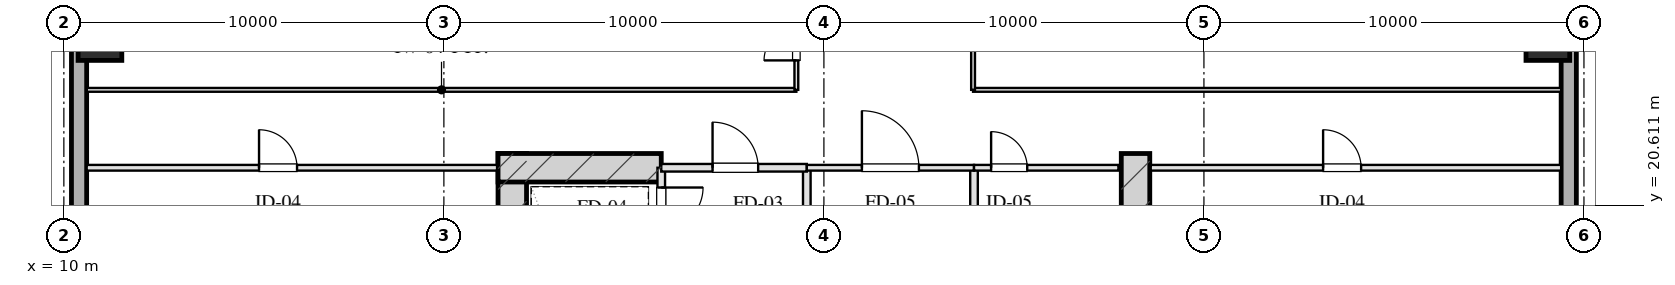
"""IFC4 building model, lengths in metres.
Left out: names, types, materials, properties, quantities, classifications, styles, units other than length and angle.
Written with IfcOpenShell. Run it as: python <this file> out.ifc"""

import sys

from ifc_helpers import new_model, si_unit, direction, frame, frame_2d, origin, origin_2d, place, context, subcontext, project, spatial, rectangle, hollow_rectangle, extrude, element, fill, save


model = new_model("IFC4")
c1 = context("Model", 3, precision=1e-05, world=origin(), true_north=direction((0.0, 1.0)))
c2 = subcontext(c1, "Body", "Model", "MODEL_VIEW")
j1 = project(units=[si_unit("LENGTHUNIT", "METRE"), si_unit("PLANEANGLEUNIT", "RADIAN")], contexts=[c1])
p1 = place(None, origin())
s1 = spatial("IfcSite", under=j1, at=p1, CompositionType="ELEMENT")
p2 = place(p1, origin())
s2 = spatial("IfcBuilding", under=s1, at=p2, CompositionType="ELEMENT")
p3 = place(p2, frame((0.0, 0.0, 38.0)))
s3 = spatial("IfcBuildingStorey", under=s2, at=p3, CompositionType="ELEMENT", Elevation=38.0)
for number, where, z_axis, x_axis in (
    (1, (21.8, 21.975, 0.0), (0.0, 0.0, 1.0), (0.0, -1.0, 0.0)),
    (2, (38.2, 21.975, 0.0), (0.0, 0.0, 1.0), (0.0, -1.0, 0.0)),
):
    element("IfcWall", number, at=place(p3, frame(where, z_axis=z_axis, x_axis=x_axis)), inside=s3, PredefinedType="SHEAR", context=c2, shape_type="SweptSolid", body=[
        extrude(rectangle(XDim=9.63, YDim=0.75, at=frame_2d((4.815, 0.0))), origin(), (0.0, 0.0, 1.0), 4.0),
    ])
p4 = place(p3, frame((21.425, 21.6, 0.0), z_axis=(0.0, 0.0, 1.0), x_axis=(1.0, 0.0, 0.0)))
e3 = element("IfcWall", 3, at=p4, inside=s3, PredefinedType="SHEAR", context=c2, shape_type="SweptSolid", body=[
    extrude(rectangle(XDim=4.295, YDim=0.75, at=frame_2d((2.147, 0.0))), origin(), (0.0, 0.0, 1.0), 4.0),
])
for number, where, z_axis, x_axis in (
    (4, (10.95, 25.0, 0.0), (0.0, 0.0, 1.0), (1.0, 0.0, 0.0)),
    (5, (49.05, 25.0, 0.0), (0.0, 0.0, 1.0), (1.0, 0.0, 0.0)),
):
    element("IfcColumn", number, at=place(p3, frame(where, z_axis=z_axis, x_axis=x_axis)), inside=s3, PredefinedType="COLUMN", context=c2, shape_type="SweptSolid", body=[
        extrude(hollow_rectangle(XDim=1.15, YDim=1.15, WallThickness=0.04, at=origin_2d()), origin(), (0.0, 0.0, 1.0), 4.001),
    ])
p5 = place(p3, frame((10.4, 7.2, 0.0), z_axis=(0.0, 0.0, 1.0), x_axis=(0.0, 1.0, 0.0)))
e6 = element("IfcWall", 6, at=p5, inside=s3, PredefinedType="SOLIDWALL", context=c2, shape_type="SweptSolid", body=[
    extrude(rectangle(XDim=53.6, YDim=0.4, at=frame_2d((26.8, 0.0))), origin(), (0.0, 0.0, 1.0), 3.16),
])
p6 = place(p5, frame((28.15, 0.0, 0.75)))
e7 = element("IfcOpeningElement", 7, at=p6, cuts=e6, PredefinedType="OPENING", context=c2, shape_type="SweptSolid", body=[
    extrude(rectangle(XDim=2.5, YDim=1.75, at=frame_2d((1.25, 0.875))), frame((0.0, 0.21, 0.0), z_axis=(0.0, -1.0, 0.0), x_axis=(1.0, 0.0, 0.0)), (0.0, 0.0, 1.0), 0.42),
])
p7 = place(p5, frame((20.45, 0.0, 0.0)))
e8 = element("IfcOpeningElement", 8, at=p7, cuts=e6, PredefinedType="OPENING", context=c2, shape_type="SweptSolid", body=[
    extrude(rectangle(XDim=1.1, YDim=2.15, at=frame_2d((0.55, 1.075))), frame((0.0, 0.21, 0.0), z_axis=(0.0, -1.0, 0.0), x_axis=(1.0, 0.0, 0.0)), (0.0, 0.0, 1.0), 0.42),
])
p8 = place(p3, frame((49.6, 60.8, 0.0), z_axis=(0.0, 0.0, 1.0), x_axis=(0.0, -1.0, 0.0)))
e9 = element("IfcWall", 9, at=p8, inside=s3, PredefinedType="SOLIDWALL", context=c2, shape_type="SweptSolid", body=[
    extrude(rectangle(XDim=53.6, YDim=0.4, at=frame_2d((26.8, 0.0))), origin(), (0.0, 0.0, 1.0), 3.16),
])
p9 = place(p8, frame((19.15, 0.0, 0.75)))
e10 = element("IfcOpeningElement", 10, at=p9, cuts=e9, PredefinedType="OPENING", context=c2, shape_type="SweptSolid", body=[
    extrude(rectangle(XDim=2.5, YDim=1.75, at=frame_2d((1.25, 0.875))), frame((0.0, 0.21, 0.0), z_axis=(0.0, -1.0, 0.0), x_axis=(1.0, 0.0, 0.0)), (0.0, 0.0, 1.0), 0.42),
])
p10 = place(p8, frame((32.05, 0.0, 0.0)))
e11 = element("IfcOpeningElement", 11, at=p10, cuts=e9, PredefinedType="OPENING", context=c2, shape_type="SweptSolid", body=[
    extrude(rectangle(XDim=1.1, YDim=2.15, at=frame_2d((0.55, 1.075))), frame((0.0, 0.21, 0.0), z_axis=(0.0, -1.0, 0.0), x_axis=(1.0, 0.0, 0.0)), (0.0, 0.0, 1.0), 0.42),
])
p11 = place(p3, frame((25.72, 21.6, 0.0), z_axis=(0.0, 0.0, 1.0), x_axis=(0.0, -1.0, 0.0)))
e12 = element("IfcWall", 12, at=p11, inside=s3, PredefinedType="PARTITIONING", context=c2, shape_type="SweptSolid", body=[
    extrude(rectangle(XDim=1.9, YDim=0.2, at=frame_2d((0.95, 0.0))), origin(), (0.0, 0.0, 1.0), 3.725),
])
p12 = place(p11, frame((0.52, 0.0, 0.0)))
e13 = element("IfcOpeningElement", 13, at=p12, cuts=e12, PredefinedType="OPENING", context=c2, shape_type="SweptSolid", body=[
    extrude(rectangle(XDim=1.1, YDim=2.05, at=frame_2d((0.55, 1.025))), frame((0.0, 0.11, 0.0), z_axis=(0.0, -1.0, 0.0), x_axis=(1.0, 0.0, 0.0)), (0.0, 0.0, 1.0), 0.22),
])
p13 = place(p3, frame((29.55, 21.6, 0.0), z_axis=(0.0, 0.0, 1.0), x_axis=(0.0, -1.0, 0.0)))
e14 = element("IfcWall", 14, at=p13, inside=s3, PredefinedType="PARTITIONING", context=c2, shape_type="SweptSolid", body=[
    extrude(rectangle(XDim=8.43, YDim=0.2, at=frame_2d((4.215, 0.0))), origin(), (0.0, 0.0, 1.0), 3.725),
])
p14 = place(p3, frame((25.72, 21.6, 0.0), z_axis=(0.0, 0.0, 1.0), x_axis=(1.0, 0.0, 0.0)))
e15 = element("IfcWall", 15, at=p14, inside=s3, PredefinedType="PARTITIONING", context=c2, shape_type="SweptSolid", body=[
    extrude(rectangle(XDim=3.83, YDim=0.2, at=frame_2d((1.915, 0.0))), origin(), (0.0, 0.0, 1.0), 3.725),
])
p15 = place(p14, frame((1.35, 0.0, 0.0)))
e16 = element("IfcOpeningElement", 16, at=p15, cuts=e15, PredefinedType="OPENING", context=c2, shape_type="SweptSolid", body=[
    extrude(rectangle(XDim=1.2, YDim=2.05, at=frame_2d((0.6, 1.025))), frame((0.0, 0.11, 0.0), z_axis=(0.0, -1.0, 0.0), x_axis=(1.0, 0.0, 0.0)), (0.0, 0.0, 1.0), 0.22),
])
p16 = place(p3, frame((33.95, 21.6, 0.0), z_axis=(0.0, 0.0, 1.0), x_axis=(0.0, -1.0, 0.0)))
e17 = element("IfcWall", 17, at=p16, inside=s3, PredefinedType="PARTITIONING", context=c2, shape_type="SweptSolid", body=[
    extrude(rectangle(XDim=8.43, YDim=0.2, at=frame_2d((4.215, 0.0))), origin(), (0.0, 0.0, 1.0), 3.725),
])
p17 = place(p3, frame((29.55, 21.6, 0.0), z_axis=(0.0, 0.0, 1.0), x_axis=(1.0, 0.0, 0.0)))
e18 = element("IfcWall", 18, at=p17, inside=s3, PredefinedType="PARTITIONING", context=c2, shape_type="SweptSolid", body=[
    extrude(rectangle(XDim=4.4, YDim=0.15, at=frame_2d((2.2, 0.0))), origin(), (0.0, 0.0, 1.0), 3.725),
])
p18 = place(p17, frame((1.45, 0.0, 0.0)))
e19 = element("IfcOpeningElement", 19, at=p18, cuts=e18, PredefinedType="OPENING", context=c2, shape_type="SweptSolid", body=[
    extrude(rectangle(XDim=1.5, YDim=2.05, at=frame_2d((0.75, 1.025))), frame((0.0, 0.085, 0.0), z_axis=(0.0, -1.0, 0.0), x_axis=(1.0, 0.0, 0.0)), (0.0, 0.0, 1.0), 0.17),
])
p19 = place(p3, frame((33.95, 21.6, 0.0), z_axis=(0.0, 0.0, 1.0), x_axis=(1.0, 0.0, 0.0)))
e20 = element("IfcWall", 20, at=p19, inside=s3, PredefinedType="PARTITIONING", context=c2, shape_type="SweptSolid", body=[
    extrude(rectangle(XDim=3.8, YDim=0.15, at=frame_2d((1.9, 0.0))), origin(), (0.0, 0.0, 1.0), 3.725),
])
p20 = place(p19, frame((0.45, 0.0, 0.0)))
e21 = element("IfcOpeningElement", 21, at=p20, cuts=e20, PredefinedType="OPENING", context=c2, shape_type="SweptSolid", body=[
    extrude(rectangle(XDim=0.95, YDim=2.05, at=frame_2d((0.475, 1.025))), frame((0.0, 0.085, 0.0), z_axis=(0.0, -1.0, 0.0), x_axis=(1.0, 0.0, 0.0)), (0.0, 0.0, 1.0), 0.17),
])
p21 = place(p3, frame((10.6, 21.6, 0.0), z_axis=(0.0, 0.0, 1.0), x_axis=(1.0, 0.0, 0.0)))
e22 = element("IfcWall", 22, at=p21, inside=s3, PredefinedType="PARTITIONING", context=c2, shape_type="SweptSolid", body=[
    extrude(rectangle(XDim=10.8, YDim=0.15, at=frame_2d((5.4, 0.0))), origin(), (0.0, 0.0, 1.0), 3.725),
])
p22 = place(p21, frame((4.536, 0.0, 0.0)))
e23 = element("IfcOpeningElement", 23, at=p22, cuts=e22, PredefinedType="OPENING", context=c2, shape_type="SweptSolid", body=[
    extrude(rectangle(XDim=1.0, YDim=2.05, at=frame_2d((0.5, 1.025))), frame((0.0, 0.085, 0.0), z_axis=(0.0, -1.0, 0.0), x_axis=(1.0, 0.0, 0.0)), (0.0, 0.0, 1.0), 0.17),
])
p23 = place(p3, frame((38.6, 21.6, 0.0), z_axis=(0.0, 0.0, 1.0), x_axis=(1.0, 0.0, 0.0)))
e24 = element("IfcWall", 24, at=p23, inside=s3, PredefinedType="PARTITIONING", context=c2, shape_type="SweptSolid", body=[
    extrude(rectangle(XDim=10.8, YDim=0.15, at=frame_2d((5.4, 0.0))), origin(), (0.0, 0.0, 1.0), 3.725),
])
p24 = place(p23, frame((4.536, 0.0, 0.0)))
e25 = element("IfcOpeningElement", 25, at=p24, cuts=e24, PredefinedType="OPENING", context=c2, shape_type="SweptSolid", body=[
    extrude(rectangle(XDim=1.0, YDim=2.05, at=frame_2d((0.5, 1.025))), frame((0.0, 0.085, 0.0), z_axis=(0.0, -1.0, 0.0), x_axis=(1.0, 0.0, 0.0)), (0.0, 0.0, 1.0), 0.17),
])
p25 = place(p3, frame((10.6, 23.65, 0.0), z_axis=(0.0, 0.0, 1.0), x_axis=(1.0, 0.0, 0.0)))
e26 = element("IfcWall", 26, at=p25, inside=s3, PredefinedType="MOVABLE", context=c2, shape_type="SweptSolid", body=[
    extrude(rectangle(XDim=18.675, YDim=0.1, at=frame_2d((9.337, 0.0))), origin(), (0.0, 0.0, 1.0), 3.725),
])
p26 = place(p3, frame((33.925, 23.65, 0.0), z_axis=(0.0, 0.0, 1.0), x_axis=(1.0, 0.0, 0.0)))
e27 = element("IfcWall", 27, at=p26, inside=s3, PredefinedType="MOVABLE", context=c2, shape_type="SweptSolid", body=[
    extrude(rectangle(XDim=15.475, YDim=0.1, at=frame_2d((7.737, 0.0))), origin(), (0.0, 0.0, 1.0), 3.725),
])
p27 = place(p3, frame((29.275, 23.65, 0.0), z_axis=(0.0, 0.0, 1.0), x_axis=(0.0, 1.0, 0.0)))
e28 = element("IfcWall", 28, at=p27, inside=s3, PredefinedType="MOVABLE", context=c2, shape_type="SweptSolid", body=[
    extrude(rectangle(XDim=20.7, YDim=0.1, at=frame_2d((10.35, 0.0))), origin(), (0.0, 0.0, 1.0), 3.725),
])
p28 = place(p27, frame((0.775, 0.0, 0.0)))
e29 = element("IfcOpeningElement", 29, at=p28, cuts=e28, PredefinedType="OPENING", context=c2, shape_type="SweptSolid", body=[
    extrude(rectangle(XDim=0.85, YDim=2.05, at=frame_2d((0.425, 1.025))), frame((0.0, 0.06, 0.0), z_axis=(0.0, -1.0, 0.0), x_axis=(1.0, 0.0, 0.0)), (0.0, 0.0, 1.0), 0.12),
])
p29 = place(p27, frame((3.95, 0.0, 0.0)))
e30 = element("IfcOpeningElement", 30, at=p29, cuts=e28, PredefinedType="OPENING", context=c2, shape_type="SweptSolid", body=[
    extrude(rectangle(XDim=1.0, YDim=2.05, at=frame_2d((0.5, 1.025))), frame((0.0, 0.06, 0.0), z_axis=(0.0, -1.0, 0.0), x_axis=(1.0, 0.0, 0.0)), (0.0, 0.0, 1.0), 0.12),
])
p30 = place(p27, frame((8.364, 0.0, 0.0)))
e31 = element("IfcOpeningElement", 31, at=p30, cuts=e28, PredefinedType="OPENING", context=c2, shape_type="SweptSolid", body=[
    extrude(rectangle(XDim=1.05, YDim=2.05, at=frame_2d((0.525, 1.025))), frame((0.0, 0.06, 0.0), z_axis=(0.0, -1.0, 0.0), x_axis=(1.0, 0.0, 0.0)), (0.0, 0.0, 1.0), 0.12),
])
p31 = place(p27, frame((12.864, 0.0, 0.0)))
e32 = element("IfcOpeningElement", 32, at=p31, cuts=e28, PredefinedType="OPENING", context=c2, shape_type="SweptSolid", body=[
    extrude(rectangle(XDim=1.0, YDim=2.05, at=frame_2d((0.5, 1.025))), frame((0.0, 0.06, 0.0), z_axis=(0.0, -1.0, 0.0), x_axis=(1.0, 0.0, 0.0)), (0.0, 0.0, 1.0), 0.12),
])
p32 = place(p27, frame((16.383, 0.0, 0.0)))
e33 = element("IfcOpeningElement", 33, at=p32, cuts=e28, PredefinedType="OPENING", context=c2, shape_type="SweptSolid", body=[
    extrude(rectangle(XDim=1.0, YDim=2.05, at=frame_2d((0.5, 1.025))), frame((0.0, 0.06, 0.0), z_axis=(0.0, -1.0, 0.0), x_axis=(1.0, 0.0, 0.0)), (0.0, 0.0, 1.0), 0.12),
])
p33 = place(p27, frame((19.058, 0.0, 0.0)))
e34 = element("IfcOpeningElement", 34, at=p33, cuts=e28, PredefinedType="OPENING", context=c2, shape_type="SweptSolid", body=[
    extrude(rectangle(XDim=1.0, YDim=2.05, at=frame_2d((0.5, 1.025))), frame((0.0, 0.06, 0.0), z_axis=(0.0, -1.0, 0.0), x_axis=(1.0, 0.0, 0.0)), (0.0, 0.0, 1.0), 0.12),
])
p34 = place(p3, frame((33.925, 23.65, 0.0), z_axis=(0.0, 0.0, 1.0), x_axis=(0.0, 1.0, 0.0)))
e35 = element("IfcWall", 35, at=p34, inside=s3, PredefinedType="MOVABLE", context=c2, shape_type="SweptSolid", body=[
    extrude(rectangle(XDim=20.7, YDim=0.1, at=frame_2d((10.35, 0.0))), origin(), (0.0, 0.0, 1.0), 3.725),
])
p35 = place(p34, frame((2.675, 0.0, 0.0)))
e36 = element("IfcOpeningElement", 36, at=p35, cuts=e35, PredefinedType="OPENING", context=c2, shape_type="SweptSolid", body=[
    extrude(rectangle(XDim=1.0, YDim=2.05, at=frame_2d((0.5, 1.025))), frame((0.0, 0.06, 0.0), z_axis=(0.0, -1.0, 0.0), x_axis=(1.0, 0.0, 0.0)), (0.0, 0.0, 1.0), 0.12),
])
p36 = place(p34, frame((9.85, 0.0, 0.0)))
e37 = element("IfcOpeningElement", 37, at=p36, cuts=e35, PredefinedType="OPENING", context=c2, shape_type="SweptSolid", body=[
    extrude(rectangle(XDim=1.0, YDim=2.05, at=frame_2d((0.5, 1.025))), frame((0.0, 0.06, 0.0), z_axis=(0.0, -1.0, 0.0), x_axis=(1.0, 0.0, 0.0)), (0.0, 0.0, 1.0), 0.12),
])
p37 = place(p34, frame((17.025, 0.0, 0.0)))
e38 = element("IfcOpeningElement", 38, at=p37, cuts=e35, PredefinedType="OPENING", context=c2, shape_type="SweptSolid", body=[
    extrude(rectangle(XDim=1.0, YDim=2.05, at=frame_2d((0.5, 1.025))), frame((0.0, 0.06, 0.0), z_axis=(0.0, -1.0, 0.0), x_axis=(1.0, 0.0, 0.0)), (0.0, 0.0, 1.0), 0.12),
])
p38 = place(p12, origin())
e39 = element("IfcDoor", 39, at=p38, inside=s3, OperationType="SINGLE_SWING_LEFT", PredefinedType="DOOR", context=c2, shape_type="SweptSolid", body=[
    extrude(rectangle(XDim=1.1, YDim=2.05, at=frame_2d((0.55, 1.025))), frame((0.0, 0.025, 0.0), z_axis=(0.0, -1.0, 0.0), x_axis=(1.0, 0.0, 0.0)), (0.0, 0.0, 1.0), 0.05),
])
fill(e13, e39)
p39 = place(p15, origin())
e40 = element("IfcDoor", 40, at=p39, inside=s3, OperationType="SINGLE_SWING_LEFT", PredefinedType="DOOR", context=c2, shape_type="SweptSolid", body=[
    extrude(rectangle(XDim=1.2, YDim=2.05, at=frame_2d((0.6, 1.025))), frame((0.0, 0.025, 0.0), z_axis=(0.0, -1.0, 0.0), x_axis=(1.0, 0.0, 0.0)), (0.0, 0.0, 1.0), 0.05),
])
fill(e16, e40)
p40 = place(p18, origin())
e41 = element("IfcDoor", 41, at=p40, inside=s3, OperationType="SINGLE_SWING_LEFT", PredefinedType="DOOR", context=c2, shape_type="SweptSolid", body=[
    extrude(rectangle(XDim=1.5, YDim=2.05, at=frame_2d((0.75, 1.025))), frame((0.0, 0.025, 0.0), z_axis=(0.0, -1.0, 0.0), x_axis=(1.0, 0.0, 0.0)), (0.0, 0.0, 1.0), 0.05),
])
fill(e19, e41)
p41 = place(p20, origin())
e42 = element("IfcDoor", 42, at=p41, inside=s3, OperationType="SINGLE_SWING_LEFT", PredefinedType="DOOR", context=c2, shape_type="SweptSolid", body=[
    extrude(rectangle(XDim=0.95, YDim=2.05, at=frame_2d((0.475, 1.025))), frame((0.0, 0.025, 0.0), z_axis=(0.0, -1.0, 0.0), x_axis=(1.0, 0.0, 0.0)), (0.0, 0.0, 1.0), 0.05),
])
fill(e21, e42)
p42 = place(p22, origin())
e43 = element("IfcDoor", 43, at=p42, inside=s3, OperationType="SINGLE_SWING_LEFT", PredefinedType="DOOR", context=c2, shape_type="SweptSolid", body=[
    extrude(rectangle(XDim=1.0, YDim=2.05, at=frame_2d((0.5, 1.025))), frame((0.0, 0.025, 0.0), z_axis=(0.0, -1.0, 0.0), x_axis=(1.0, 0.0, 0.0)), (0.0, 0.0, 1.0), 0.05),
])
fill(e23, e43)
p43 = place(p24, origin())
e44 = element("IfcDoor", 44, at=p43, inside=s3, OperationType="SINGLE_SWING_LEFT", PredefinedType="DOOR", context=c2, shape_type="SweptSolid", body=[
    extrude(rectangle(XDim=1.0, YDim=2.05, at=frame_2d((0.5, 1.025))), frame((0.0, 0.025, 0.0), z_axis=(0.0, -1.0, 0.0), x_axis=(1.0, 0.0, 0.0)), (0.0, 0.0, 1.0), 0.05),
])
fill(e25, e44)
p44 = place(p28, origin())
e45 = element("IfcDoor", 45, at=p44, inside=s3, OperationType="SINGLE_SWING_LEFT", PredefinedType="DOOR", context=c2, shape_type="SweptSolid", body=[
    extrude(rectangle(XDim=0.85, YDim=2.05, at=frame_2d((0.425, 1.025))), frame((0.0, 0.025, 0.0), z_axis=(0.0, -1.0, 0.0), x_axis=(1.0, 0.0, 0.0)), (0.0, 0.0, 1.0), 0.05),
])
fill(e29, e45)
save(model, sys.argv[1])
